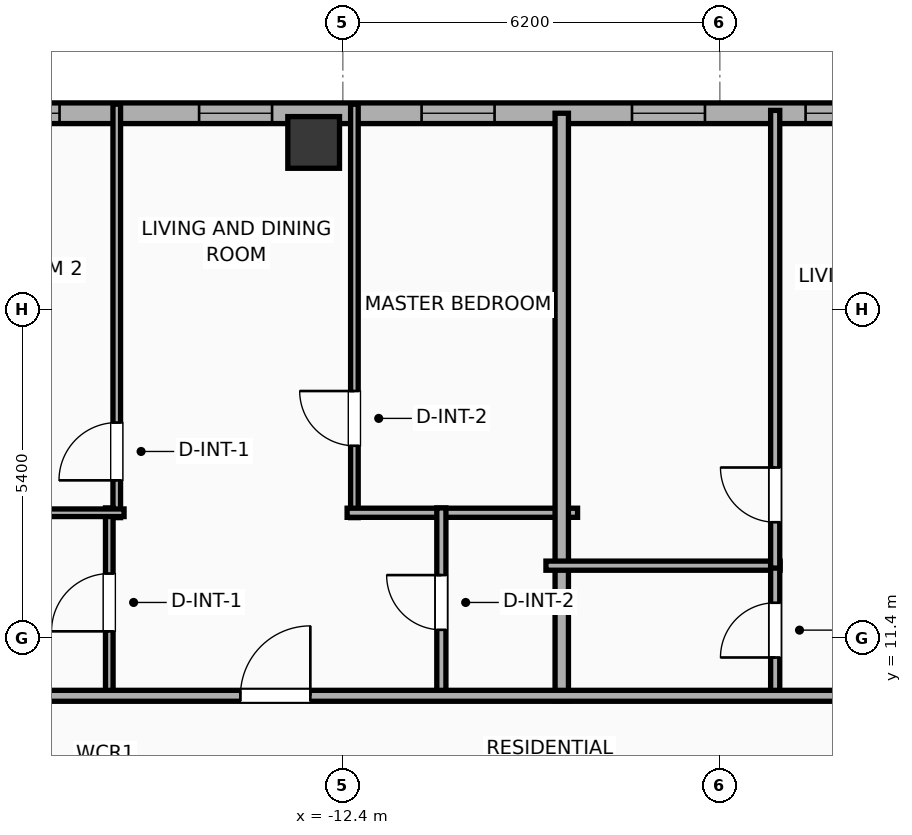
"""IFC4 building model, lengths in metres.
Left out: names, types, materials, properties, quantities, classifications, styles, units other than length and angle.
Written with IfcOpenShell. Run it as: python <this file> out.ifc"""

import sys

from ifc_helpers import new_model, si_unit, direction, frame, frame_2d, origin, origin_2d, place, context, subcontext, project, spatial, rectangle, hollow_rectangle, extrude, element, fill, save


model = new_model("IFC4")
c1 = context("Model", 3, precision=1e-05, world=origin(), true_north=direction((0.0, 1.0)))
c2 = subcontext(c1, "Body", "Model", "MODEL_VIEW")
j1 = project(units=[si_unit("LENGTHUNIT", "METRE"), si_unit("PLANEANGLEUNIT", "RADIAN")], contexts=[c1])
p1 = place(None, origin())
s1 = spatial("IfcSite", under=j1, at=p1, CompositionType="ELEMENT")
p2 = place(p1, origin())
s2 = spatial("IfcBuilding", under=s1, at=p2, CompositionType="ELEMENT")
p3 = place(p2, frame((0.0, 0.0, 227.5)))
s3 = spatial("IfcBuildingStorey", under=s2, at=p3, CompositionType="ELEMENT", Elevation=227.5)
p4 = place(p3, frame((-12.88, 19.55, 0.0), z_axis=(0.0, 0.0, 1.0), x_axis=(1.0, 0.0, 0.0)))
e1 = element("IfcColumn", 1, at=p4, inside=s3, PredefinedType="COLUMN", context=c2, shape_type="SweptSolid", body=[
    extrude(hollow_rectangle(XDim=0.85, YDim=0.85, WallThickness=0.028, at=origin_2d()), origin(), (0.0, 0.0, 1.0), 3.9),
])
p5 = place(p3, frame((-22.783, 20.03, 0.0), z_axis=(0.0, 0.0, 1.0), x_axis=(1.0, 0.0, 0.0)))
e2 = element("IfcWall", 2, at=p5, inside=s3, PredefinedType="ELEMENTEDWALL", context=c2, shape_type="SweptSolid", body=[
    extrude(rectangle(XDim=49.566, YDim=0.34, at=frame_2d((24.783, 0.0))), origin(), (0.0, 0.0, 1.0), 3.65),
])
p6 = place(p5, frame((25.233, 0.0, 0.75)))
e3 = element("IfcOpeningElement", 3, at=p6, cuts=e2, PredefinedType="OPENING", context=c2, shape_type="SweptSolid", body=[
    extrude(rectangle(XDim=2.4, YDim=2.1, at=frame_2d((1.2, 1.05))), frame((0.0, 0.18, 0.0), z_axis=(0.0, -1.0, 0.0), x_axis=(1.0, 0.0, 0.0)), (0.0, 0.0, 1.0), 0.36),
])
p7 = place(p5, frame((41.756, 0.0, 0.75)))
e4 = element("IfcOpeningElement", 4, at=p7, cuts=e2, PredefinedType="OPENING", context=c2, shape_type="SweptSolid", body=[
    extrude(rectangle(XDim=2.4, YDim=2.1, at=frame_2d((1.2, 1.05))), frame((0.0, 0.18, 0.0), z_axis=(0.0, -1.0, 0.0), x_axis=(1.0, 0.0, 0.0)), (0.0, 0.0, 1.0), 0.36),
])
p8 = place(p5, frame((1.637, 0.0, 0.75)))
e5 = element("IfcOpeningElement", 5, at=p8, cuts=e2, PredefinedType="OPENING", context=c2, shape_type="SweptSolid", body=[
    extrude(rectangle(XDim=1.2, YDim=2.05, at=frame_2d((0.6, 1.025))), frame((0.0, 0.18, 0.0), z_axis=(0.0, -1.0, 0.0), x_axis=(1.0, 0.0, 0.0)), (0.0, 0.0, 1.0), 0.36),
])
p9 = place(p5, frame((8.019, 0.0, 0.75)))
e6 = element("IfcOpeningElement", 6, at=p9, cuts=e2, PredefinedType="OPENING", context=c2, shape_type="SweptSolid", body=[
    extrude(rectangle(XDim=1.2, YDim=2.05, at=frame_2d((0.6, 1.025))), frame((0.0, 0.18, 0.0), z_axis=(0.0, -1.0, 0.0), x_axis=(1.0, 0.0, 0.0)), (0.0, 0.0, 1.0), 0.36),
])
p10 = place(p5, frame((4.524, 0.0, 0.75)))
e7 = element("IfcOpeningElement", 7, at=p10, cuts=e2, PredefinedType="OPENING", context=c2, shape_type="SweptSolid", body=[
    extrude(rectangle(XDim=1.2, YDim=2.05, at=frame_2d((0.6, 1.025))), frame((0.0, 0.18, 0.0), z_axis=(0.0, -1.0, 0.0), x_axis=(1.0, 0.0, 0.0)), (0.0, 0.0, 1.0), 0.36),
])
p11 = place(p5, frame((11.678, 0.0, 0.75)))
e8 = element("IfcOpeningElement", 8, at=p11, cuts=e2, PredefinedType="OPENING", context=c2, shape_type="SweptSolid", body=[
    extrude(rectangle(XDim=1.2, YDim=2.05, at=frame_2d((0.6, 1.025))), frame((0.0, 0.18, 0.0), z_axis=(0.0, -1.0, 0.0), x_axis=(1.0, 0.0, 0.0)), (0.0, 0.0, 1.0), 0.36),
])
p12 = place(p5, frame((17.993, 0.0, 0.75)))
e9 = element("IfcOpeningElement", 9, at=p12, cuts=e2, PredefinedType="OPENING", context=c2, shape_type="SweptSolid", body=[
    extrude(rectangle(XDim=1.2, YDim=2.05, at=frame_2d((0.6, 1.025))), frame((0.0, 0.18, 0.0), z_axis=(0.0, -1.0, 0.0), x_axis=(1.0, 0.0, 0.0)), (0.0, 0.0, 1.0), 0.36),
])
p13 = place(p5, frame((15.138, 0.0, 0.75)))
e10 = element("IfcOpeningElement", 10, at=p13, cuts=e2, PredefinedType="OPENING", context=c2, shape_type="SweptSolid", body=[
    extrude(rectangle(XDim=1.2, YDim=2.05, at=frame_2d((0.6, 1.025))), frame((0.0, 0.18, 0.0), z_axis=(0.0, -1.0, 0.0), x_axis=(1.0, 0.0, 0.0)), (0.0, 0.0, 1.0), 0.36),
])
p14 = place(p5, frame((22.278, 0.0, 0.75)))
e11 = element("IfcOpeningElement", 11, at=p14, cuts=e2, PredefinedType="OPENING", context=c2, shape_type="SweptSolid", body=[
    extrude(rectangle(XDim=1.2, YDim=2.05, at=frame_2d((0.6, 1.025))), frame((0.0, 0.18, 0.0), z_axis=(0.0, -1.0, 0.0), x_axis=(1.0, 0.0, 0.0)), (0.0, 0.0, 1.0), 0.36),
])
p15 = place(p5, frame((30.384, 0.0, 0.75)))
e12 = element("IfcOpeningElement", 12, at=p15, cuts=e2, PredefinedType="OPENING", context=c2, shape_type="SweptSolid", body=[
    extrude(rectangle(XDim=0.85, YDim=2.05, at=frame_2d((0.425, 1.025))), frame((0.0, 0.18, 0.0), z_axis=(0.0, -1.0, 0.0), x_axis=(1.0, 0.0, 0.0)), (0.0, 0.0, 1.0), 0.36),
])
p16 = place(p5, frame((32.603, 0.0, 0.75)))
e13 = element("IfcOpeningElement", 13, at=p16, cuts=e2, PredefinedType="OPENING", context=c2, shape_type="SweptSolid", body=[
    extrude(rectangle(XDim=1.2, YDim=2.05, at=frame_2d((0.6, 1.025))), frame((0.0, 0.18, 0.0), z_axis=(0.0, -1.0, 0.0), x_axis=(1.0, 0.0, 0.0)), (0.0, 0.0, 1.0), 0.36),
])
p17 = place(p5, frame((37.223, 0.0, 0.75)))
e14 = element("IfcOpeningElement", 14, at=p17, cuts=e2, PredefinedType="OPENING", context=c2, shape_type="SweptSolid", body=[
    extrude(rectangle(XDim=1.2, YDim=2.05, at=frame_2d((0.6, 1.025))), frame((0.0, 0.18, 0.0), z_axis=(0.0, -1.0, 0.0), x_axis=(1.0, 0.0, 0.0)), (0.0, 0.0, 1.0), 0.36),
])
p18 = place(p5, frame((45.099, 0.0, 0.75)))
e15 = element("IfcOpeningElement", 15, at=p18, cuts=e2, PredefinedType="OPENING", context=c2, shape_type="SweptSolid", body=[
    extrude(rectangle(XDim=1.2, YDim=2.05, at=frame_2d((0.6, 1.025))), frame((0.0, 0.18, 0.0), z_axis=(0.0, -1.0, 0.0), x_axis=(1.0, 0.0, 0.0)), (0.0, 0.0, 1.0), 0.36),
])
p19 = place(p5, frame((47.209, 0.0, 0.75)))
e16 = element("IfcOpeningElement", 16, at=p19, cuts=e2, PredefinedType="OPENING", context=c2, shape_type="SweptSolid", body=[
    extrude(rectangle(XDim=1.2, YDim=2.05, at=frame_2d((0.6, 1.025))), frame((0.0, 0.18, 0.0), z_axis=(0.0, -1.0, 0.0), x_axis=(1.0, 0.0, 0.0)), (0.0, 0.0, 1.0), 0.36),
])
p20 = place(p3, frame((-16.118, 13.38, 0.0), z_axis=(0.0, 0.0, 1.0), x_axis=(0.0, 1.0, 0.0)))
e17 = element("IfcWall", 17, at=p20, inside=s3, PredefinedType="PARTITIONING", context=c2, shape_type="SweptSolid", body=[
    extrude(rectangle(XDim=6.8, YDim=0.125, at=frame_2d((3.4, 0.0))), origin(), (0.0, 0.0, 1.0), 3.65),
])
p21 = place(p20, frame((0.613, 0.0, 0.0)))
e18 = element("IfcOpeningElement", 18, at=p21, cuts=e17, PredefinedType="OPENING", context=c2, shape_type="SweptSolid", body=[
    extrude(rectangle(XDim=0.95, YDim=2.05, at=frame_2d((0.475, 1.025))), frame((0.0, 0.073, 0.0), z_axis=(0.0, -1.0, 0.0), x_axis=(1.0, 0.0, 0.0)), (0.0, 0.0, 1.0), 0.145),
])
p22 = place(p3, frame((-12.21, 13.38, 0.0), z_axis=(0.0, 0.0, 1.0), x_axis=(0.0, 1.0, 0.0)))
e19 = element("IfcWall", 19, at=p22, inside=s3, PredefinedType="PARTITIONING", context=c2, shape_type="SweptSolid", body=[
    extrude(rectangle(XDim=6.8, YDim=0.125, at=frame_2d((3.4, 0.0))), origin(), (0.0, 0.0, 1.0), 3.65),
])
p23 = place(p22, frame((1.182, 0.0, 0.0)))
e20 = element("IfcOpeningElement", 20, at=p23, cuts=e19, PredefinedType="OPENING", context=c2, shape_type="SweptSolid", body=[
    extrude(rectangle(XDim=0.9, YDim=2.05, at=frame_2d((0.45, 1.025))), frame((0.0, 0.073, 0.0), z_axis=(0.0, -1.0, 0.0), x_axis=(1.0, 0.0, 0.0)), (0.0, 0.0, 1.0), 0.145),
])
p24 = place(p3, frame((-12.33, 13.46, 0.0), z_axis=(0.0, 0.0, 1.0), x_axis=(1.0, 0.0, 0.0)))
e21 = element("IfcWall", 21, at=p24, inside=s3, PredefinedType="PLUMBINGWALL", context=c2, shape_type="SweptSolid", body=[
    extrude(rectangle(XDim=3.79, YDim=0.15, at=frame_2d((1.895, 0.0))), origin(), (0.0, 0.0, 1.0), 3.65),
])
p25 = place(p3, frame((-16.241, 10.43, 0.0), z_axis=(0.0, 0.0, 1.0), x_axis=(0.0, 1.0, 0.0)))
e22 = element("IfcWall", 22, at=p25, inside=s3, PredefinedType="PARTITIONING", context=c2, shape_type="SweptSolid", body=[
    extrude(rectangle(XDim=3.11, YDim=0.125, at=frame_2d((1.555, 0.0))), origin(), (0.0, 0.0, 1.0), 3.65),
])
p26 = place(p25, frame((1.08, 0.0, 0.0)))
e23 = element("IfcOpeningElement", 23, at=p26, cuts=e22, PredefinedType="OPENING", context=c2, shape_type="SweptSolid", body=[
    extrude(rectangle(XDim=0.95, YDim=2.05, at=frame_2d((0.475, 1.025))), frame((0.0, 0.073, 0.0), z_axis=(0.0, -1.0, 0.0), x_axis=(1.0, 0.0, 0.0)), (0.0, 0.0, 1.0), 0.145),
])
p27 = place(p3, frame((-19.46, 13.46, 0.0), z_axis=(0.0, 0.0, 1.0), x_axis=(1.0, 0.0, 0.0)))
e24 = element("IfcWall", 24, at=p27, inside=s3, PredefinedType="PARTITIONING", context=c2, shape_type="SweptSolid", body=[
    extrude(rectangle(XDim=3.462, YDim=0.125, at=frame_2d((1.731, 0.0))), origin(), (0.0, 0.0, 1.0), 3.65),
])
p28 = place(p3, frame((-10.78, 10.43, 0.0), z_axis=(0.0, 0.0, 1.0), x_axis=(0.0, 1.0, 0.0)))
e25 = element("IfcWall", 25, at=p28, inside=s3, PredefinedType="PLUMBINGWALL", context=c2, shape_type="SweptSolid", body=[
    extrude(rectangle(XDim=3.11, YDim=0.15, at=frame_2d((1.555, 0.0))), origin(), (0.0, 0.0, 1.0), 3.65),
])
p29 = place(p28, frame((1.105, 0.0, 0.0)))
e26 = element("IfcOpeningElement", 26, at=p29, cuts=e25, PredefinedType="OPENING", context=c2, shape_type="SweptSolid", body=[
    extrude(rectangle(XDim=0.9, YDim=2.05, at=frame_2d((0.45, 1.025))), frame((0.0, 0.085, 0.0), z_axis=(0.0, -1.0, 0.0), x_axis=(1.0, 0.0, 0.0)), (0.0, 0.0, 1.0), 0.17),
])
p30 = place(p3, frame((-8.8, 10.37, 0.0), z_axis=(0.0, 0.0, 1.0), x_axis=(0.0, 1.0, 0.0)))
e27 = element("IfcWall", 27, at=p30, inside=s3, PredefinedType="PARTITIONING", context=c2, shape_type="SweptSolid", body=[
    extrude(rectangle(XDim=9.66, YDim=0.22, at=frame_2d((4.83, 0.0))), origin(), (0.0, 0.0, 1.0), 3.65),
])
p31 = place(p3, frame((-9.06, 12.59, 0.0), z_axis=(0.0, 0.0, 1.0), x_axis=(1.0, 0.0, 0.0)))
e28 = element("IfcWall", 28, at=p31, inside=s3, PredefinedType="PLUMBINGWALL", context=c2, shape_type="SweptSolid", body=[
    extrude(rectangle(XDim=3.85, YDim=0.15, at=frame_2d((1.925, 0.0))), origin(), (0.0, 0.0, 1.0), 3.65),
])
p32 = place(p3, frame((-5.29, 10.43, 0.0), z_axis=(0.0, 0.0, 1.0), x_axis=(0.0, 1.0, 0.0)))
e29 = element("IfcWall", 29, at=p32, inside=s3, PredefinedType="PLUMBINGWALL", context=c2, shape_type="SweptSolid", body=[
    extrude(rectangle(XDim=2.2, YDim=0.15, at=frame_2d((1.1, 0.0))), origin(), (0.0, 0.0, 1.0), 3.65),
])
p33 = place(p32, frame((0.65, 0.0, 0.0)))
e30 = element("IfcOpeningElement", 30, at=p33, cuts=e29, PredefinedType="OPENING", context=c2, shape_type="SweptSolid", body=[
    extrude(rectangle(XDim=0.9, YDim=2.05, at=frame_2d((0.45, 1.025))), frame((0.0, 0.085, 0.0), z_axis=(0.0, -1.0, 0.0), x_axis=(1.0, 0.0, 0.0)), (0.0, 0.0, 1.0), 0.17),
])
p34 = place(p3, frame((-5.29, 12.55, 0.0), z_axis=(0.0, 0.0, 1.0), x_axis=(0.0, 1.0, 0.0)))
e31 = element("IfcWall", 31, at=p34, inside=s3, PredefinedType="PLUMBINGWALL", context=c2, shape_type="SweptSolid", body=[
    extrude(rectangle(XDim=7.527, YDim=0.15, at=frame_2d((3.763, 0.0))), origin(), (0.0, 0.0, 1.0), 3.65),
])
p35 = place(p34, frame((0.754, 0.0, 0.0)))
e32 = element("IfcOpeningElement", 32, at=p35, cuts=e31, PredefinedType="OPENING", context=c2, shape_type="SweptSolid", body=[
    extrude(rectangle(XDim=0.9, YDim=2.05, at=frame_2d((0.45, 1.025))), frame((0.0, 0.085, 0.0), z_axis=(0.0, -1.0, 0.0), x_axis=(1.0, 0.0, 0.0)), (0.0, 0.0, 1.0), 0.17),
])
p36 = place(p3, frame((-26.23, 10.45, 0.0), z_axis=(0.0, 0.0, 1.0), x_axis=(1.0, 0.0, 0.0)))
e33 = element("IfcWall", 33, at=p36, inside=s3, PredefinedType="PARTITIONING", context=c2, shape_type="SweptSolid", body=[
    extrude(rectangle(XDim=56.46, YDim=0.18, at=frame_2d((28.23, 0.0))), origin(), (0.0, 0.0, 1.0), 3.65),
])
p37 = place(p36, frame((3.072, 0.0, 0.0)))
e34 = element("IfcOpeningElement", 34, at=p37, cuts=e33, PredefinedType="OPENING", context=c2, shape_type="SweptSolid", body=[
    extrude(rectangle(XDim=1.15, YDim=2.05, at=frame_2d((0.575, 1.025))), frame((0.0, 0.1, 0.0), z_axis=(0.0, -1.0, 0.0), x_axis=(1.0, 0.0, 0.0)), (0.0, 0.0, 1.0), 0.2),
])
p38 = place(p36, frame((12.146, 0.0, 0.0)))
e35 = element("IfcOpeningElement", 35, at=p38, cuts=e33, PredefinedType="OPENING", context=c2, shape_type="SweptSolid", body=[
    extrude(rectangle(XDim=1.15, YDim=2.05, at=frame_2d((0.575, 1.025))), frame((0.0, 0.1, 0.0), z_axis=(0.0, -1.0, 0.0), x_axis=(1.0, 0.0, 0.0)), (0.0, 0.0, 1.0), 0.2),
])
p39 = place(p36, frame((22.302, 0.0, 0.0)))
e36 = element("IfcOpeningElement", 36, at=p39, cuts=e33, PredefinedType="OPENING", context=c2, shape_type="SweptSolid", body=[
    extrude(rectangle(XDim=1.15, YDim=2.05, at=frame_2d((0.575, 1.025))), frame((0.0, 0.1, 0.0), z_axis=(0.0, -1.0, 0.0), x_axis=(1.0, 0.0, 0.0)), (0.0, 0.0, 1.0), 0.2),
])
p40 = place(p36, frame((32.601, 0.0, 0.0)))
e37 = element("IfcOpeningElement", 37, at=p40, cuts=e33, PredefinedType="OPENING", context=c2, shape_type="SweptSolid", body=[
    extrude(rectangle(XDim=1.15, YDim=2.05, at=frame_2d((0.575, 1.025))), frame((0.0, 0.1, 0.0), z_axis=(0.0, -1.0, 0.0), x_axis=(1.0, 0.0, 0.0)), (0.0, 0.0, 1.0), 0.2),
])
p41 = place(p36, frame((40.941, 0.0, 0.0)))
e38 = element("IfcOpeningElement", 38, at=p41, cuts=e33, PredefinedType="OPENING", context=c2, shape_type="SweptSolid", body=[
    extrude(rectangle(XDim=0.9, YDim=2.05, at=frame_2d((0.45, 1.025))), frame((0.0, 0.1, 0.0), z_axis=(0.0, -1.0, 0.0), x_axis=(1.0, 0.0, 0.0)), (0.0, 0.0, 1.0), 0.2),
])
p42 = place(p36, frame((45.559, 0.0, 0.0)))
e39 = element("IfcOpeningElement", 39, at=p42, cuts=e33, PredefinedType="OPENING", context=c2, shape_type="SweptSolid", body=[
    extrude(rectangle(XDim=1.15, YDim=2.05, at=frame_2d((0.575, 1.025))), frame((0.0, 0.1, 0.0), z_axis=(0.0, -1.0, 0.0), x_axis=(1.0, 0.0, 0.0)), (0.0, 0.0, 1.0), 0.2),
])
p43 = place(p36, frame((53.125, 0.0, 0.0)))
e40 = element("IfcOpeningElement", 40, at=p43, cuts=e33, PredefinedType="OPENING", context=c2, shape_type="SweptSolid", body=[
    extrude(rectangle(XDim=0.9, YDim=2.05, at=frame_2d((0.45, 1.025))), frame((0.0, 0.1, 0.0), z_axis=(0.0, -1.0, 0.0), x_axis=(1.0, 0.0, 0.0)), (0.0, 0.0, 1.0), 0.2),
])
p44 = place(p9, origin())
e41 = element("IfcWindow", 41, at=p44, inside=s3, PartitioningType="SINGLE_PANEL", PredefinedType="WINDOW", context=c2, shape_type="SweptSolid", body=[
    extrude(rectangle(XDim=1.2, YDim=2.05, at=frame_2d((0.6, 1.025))), frame((0.0, 0.03, 0.0), z_axis=(0.0, -1.0, 0.0), x_axis=(1.0, 0.0, 0.0)), (0.0, 0.0, 1.0), 0.06),
])
fill(e6, e41)
p45 = place(p10, origin())
e42 = element("IfcWindow", 42, at=p45, inside=s3, PartitioningType="SINGLE_PANEL", PredefinedType="WINDOW", context=c2, shape_type="SweptSolid", body=[
    extrude(rectangle(XDim=1.2, YDim=2.05, at=frame_2d((0.6, 1.025))), frame((0.0, 0.03, 0.0), z_axis=(0.0, -1.0, 0.0), x_axis=(1.0, 0.0, 0.0)), (0.0, 0.0, 1.0), 0.06),
])
fill(e7, e42)
p46 = place(p11, origin())
e43 = element("IfcWindow", 43, at=p46, inside=s3, PartitioningType="SINGLE_PANEL", PredefinedType="WINDOW", context=c2, shape_type="SweptSolid", body=[
    extrude(rectangle(XDim=1.2, YDim=2.05, at=frame_2d((0.6, 1.025))), frame((0.0, 0.03, 0.0), z_axis=(0.0, -1.0, 0.0), x_axis=(1.0, 0.0, 0.0)), (0.0, 0.0, 1.0), 0.06),
])
fill(e8, e43)
p47 = place(p12, origin())
e44 = element("IfcWindow", 44, at=p47, inside=s3, PartitioningType="SINGLE_PANEL", PredefinedType="WINDOW", context=c2, shape_type="SweptSolid", body=[
    extrude(rectangle(XDim=1.2, YDim=2.05, at=frame_2d((0.6, 1.025))), frame((0.0, 0.03, 0.0), z_axis=(0.0, -1.0, 0.0), x_axis=(1.0, 0.0, 0.0)), (0.0, 0.0, 1.0), 0.06),
])
fill(e9, e44)
p48 = place(p13, origin())
e45 = element("IfcWindow", 45, at=p48, inside=s3, PartitioningType="SINGLE_PANEL", PredefinedType="WINDOW", context=c2, shape_type="SweptSolid", body=[
    extrude(rectangle(XDim=1.2, YDim=2.05, at=frame_2d((0.6, 1.025))), frame((0.0, 0.03, 0.0), z_axis=(0.0, -1.0, 0.0), x_axis=(1.0, 0.0, 0.0)), (0.0, 0.0, 1.0), 0.06),
])
fill(e10, e45)
p49 = place(p21, origin())
e46 = element("IfcDoor", 46, at=p49, inside=s3, OperationType="SINGLE_SWING_LEFT", PredefinedType="DOOR", context=c2, shape_type="SweptSolid", body=[
    extrude(rectangle(XDim=0.95, YDim=2.05, at=frame_2d((0.475, 1.025))), frame((0.0, 0.025, 0.0), z_axis=(0.0, -1.0, 0.0), x_axis=(1.0, 0.0, 0.0)), (0.0, 0.0, 1.0), 0.05),
])
fill(e18, e46)
p50 = place(p23, origin())
e47 = element("IfcDoor", 47, at=p50, inside=s3, OperationType="SINGLE_SWING_RIGHT", PredefinedType="DOOR", context=c2, shape_type="SweptSolid", body=[
    extrude(rectangle(XDim=0.9, YDim=2.05, at=frame_2d((0.45, 1.025))), frame((0.0, 0.025, 0.0), z_axis=(0.0, -1.0, 0.0), x_axis=(1.0, 0.0, 0.0)), (0.0, 0.0, 1.0), 0.05),
])
fill(e20, e47)
p51 = place(p26, origin())
e48 = element("IfcDoor", 48, at=p51, inside=s3, OperationType="SINGLE_SWING_LEFT", PredefinedType="DOOR", context=c2, shape_type="SweptSolid", body=[
    extrude(rectangle(XDim=0.95, YDim=2.05, at=frame_2d((0.475, 1.025))), frame((0.0, 0.025, 0.0), z_axis=(0.0, -1.0, 0.0), x_axis=(1.0, 0.0, 0.0)), (0.0, 0.0, 1.0), 0.05),
])
fill(e23, e48)
p52 = place(p29, origin())
e49 = element("IfcDoor", 49, at=p52, inside=s3, OperationType="SINGLE_SWING_RIGHT", PredefinedType="DOOR", context=c2, shape_type="SweptSolid", body=[
    extrude(rectangle(XDim=0.9, YDim=2.05, at=frame_2d((0.45, 1.025))), frame((0.0, 0.025, 0.0), z_axis=(0.0, -1.0, 0.0), x_axis=(1.0, 0.0, 0.0)), (0.0, 0.0, 1.0), 0.05),
])
fill(e26, e49)
p53 = place(p33, origin())
e50 = element("IfcDoor", 50, at=p53, inside=s3, OperationType="SINGLE_SWING_LEFT", PredefinedType="DOOR", context=c2, shape_type="SweptSolid", body=[
    extrude(rectangle(XDim=0.9, YDim=2.05, at=frame_2d((0.45, 1.025))), frame((0.0, 0.025, 0.0), z_axis=(0.0, -1.0, 0.0), x_axis=(1.0, 0.0, 0.0)), (0.0, 0.0, 1.0), 0.05),
])
fill(e30, e50)
p54 = place(p35, origin())
e51 = element("IfcDoor", 51, at=p54, inside=s3, OperationType="SINGLE_SWING_RIGHT", PredefinedType="DOOR", context=c2, shape_type="SweptSolid", body=[
    extrude(rectangle(XDim=0.9, YDim=2.05, at=frame_2d((0.45, 1.025))), frame((0.0, 0.025, 0.0), z_axis=(0.0, -1.0, 0.0), x_axis=(1.0, 0.0, 0.0)), (0.0, 0.0, 1.0), 0.05),
])
fill(e32, e51)
p55 = place(p38, origin())
e52 = element("IfcDoor", 52, at=p55, inside=s3, OperationType="SINGLE_SWING_RIGHT", PredefinedType="DOOR", context=c2, shape_type="SweptSolid", body=[
    extrude(rectangle(XDim=1.15, YDim=2.05, at=frame_2d((0.575, 1.025))), frame((0.0, 0.025, 0.0), z_axis=(0.0, -1.0, 0.0), x_axis=(1.0, 0.0, 0.0)), (0.0, 0.0, 1.0), 0.05),
])
fill(e35, e52)
save(model, sys.argv[1])
